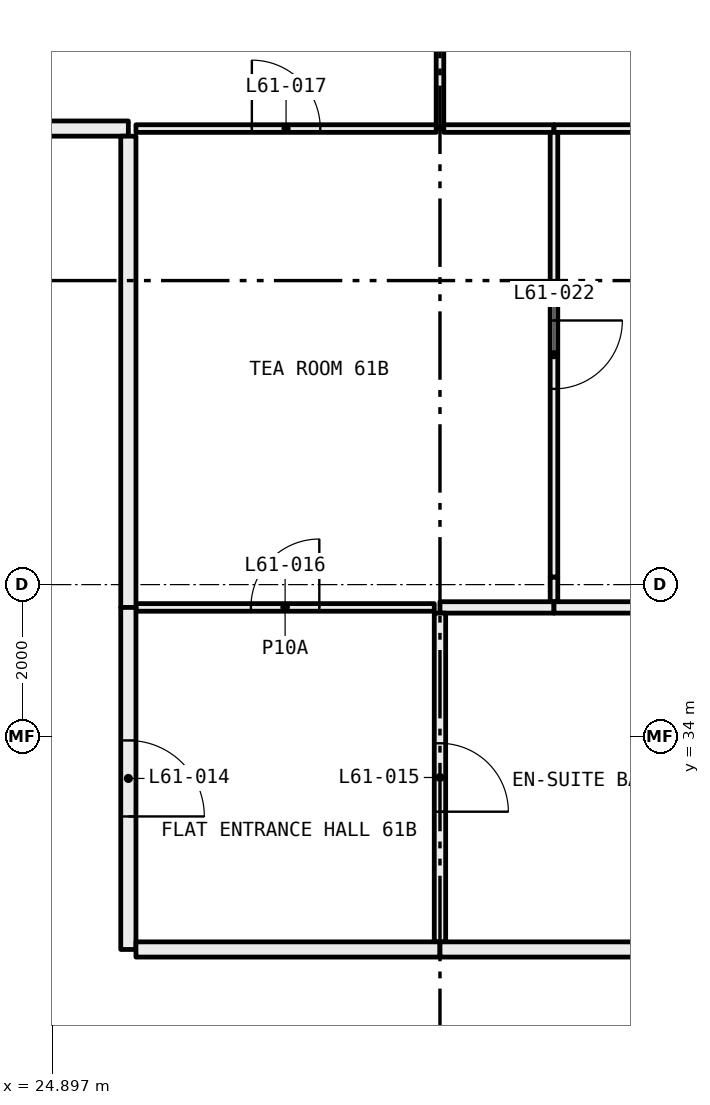
"""IFC4 building model, lengths in metres.
Left out: names, types, materials, properties, quantities, classifications, styles, units other than length and angle.
Written with IfcOpenShell. Run it as: python <this file> out.ifc"""

import sys

from ifc_helpers import new_model, si_unit, direction, frame, frame_2d, origin, place, context, subcontext, project, spatial, rectangle, extrude, element, fill, save


model = new_model("IFC4")
c1 = context("Model", 3, precision=1e-05, world=origin(), true_north=direction((0.0, 1.0)))
c2 = subcontext(c1, "Body", "Model", "MODEL_VIEW")
j1 = project(units=[si_unit("LENGTHUNIT", "METRE"), si_unit("PLANEANGLEUNIT", "RADIAN")], contexts=[c1])
p1 = place(None, origin())
s1 = spatial("IfcSite", under=j1, at=p1, CompositionType="ELEMENT")
p2 = place(p1, origin())
s2 = spatial("IfcBuilding", under=s1, at=p2, CompositionType="ELEMENT")
p3 = place(p2, frame((0.0, 0.0, 228.3)))
s3 = spatial("IfcBuildingStorey", under=s2, at=p3, CompositionType="ELEMENT", Elevation=228.3)
p4 = place(p3, frame((30.0, 42.0, 0.0), z_axis=(0.0, 0.0, 1.0), x_axis=(0.0, 1.0, 0.0)))
e1 = element("IfcWall", 1, at=p4, inside=s3, PredefinedType="PARTITIONING", context=c2, shape_type="SweptSolid", body=[
    extrude(rectangle(XDim=5.28, YDim=0.1, at=frame_2d((2.64, 0.0))), origin(), (0.0, 0.0, 1.0), 3.05),
])
p5 = place(p4, frame((2.19, 0.0, 0.0)))
e2 = element("IfcOpeningElement", 2, at=p5, cuts=e1, PredefinedType="OPENING", context=c2, shape_type="SweptSolid", body=[
    extrude(rectangle(XDim=0.9, YDim=2.1, at=frame_2d((0.45, 1.05))), frame((0.0, 0.06, 0.0), z_axis=(0.0, -1.0, 0.0), x_axis=(1.0, 0.0, 0.0)), (0.0, 0.0, 1.0), 0.12),
])
p6 = place(p3, frame((26.0, 42.0, 0.0), z_axis=(0.0, 0.0, 1.0), x_axis=(1.0, 0.0, 0.0)))
e3 = element("IfcWall", 3, at=p6, inside=s3, PredefinedType="PARTITIONING", context=c2, shape_type="SweptSolid", body=[
    extrude(rectangle(XDim=3.95, YDim=0.1, at=frame_2d((1.975, 0.0))), origin(), (0.0, 0.0, 1.0), 3.05),
])
p7 = place(p6, frame((1.525, 0.0, 0.0)))
e4 = element("IfcOpeningElement", 4, at=p7, cuts=e3, PredefinedType="OPENING", context=c2, shape_type="SweptSolid", body=[
    extrude(rectangle(XDim=0.9, YDim=2.1, at=frame_2d((0.45, 1.05))), frame((0.0, 0.06, 0.0), z_axis=(0.0, -1.0, 0.0), x_axis=(1.0, 0.0, 0.0)), (0.0, 0.0, 1.0), 0.12),
])
p8 = place(p3, frame((24.0, 42.0, 0.0), z_axis=(0.0, 0.0, 1.0), x_axis=(1.0, 0.0, 0.0)))
e5 = element("IfcWall", 5, at=p8, inside=s3, PredefinedType="PARTITIONING", context=c2, shape_type="SweptSolid", body=[
    extrude(rectangle(XDim=1.9, YDim=0.2, at=frame_2d((0.95, 0.0))), origin(), (0.0, 0.0, 1.0), 3.05),
])
p9 = place(p3, frame((30.05, 42.0, 0.0), z_axis=(0.0, 0.0, 1.0), x_axis=(1.0, 0.0, 0.0)))
e6 = element("IfcWall", 6, at=p9, inside=s3, PredefinedType="PARTITIONING", context=c2, shape_type="SweptSolid", body=[
    extrude(rectangle(XDim=1.45, YDim=0.1, at=frame_2d((0.725, 0.0))), origin(), (0.0, 0.0, 1.0), 3.05),
])
p10 = place(p3, frame((31.5, 42.0, 0.0), z_axis=(0.0, 0.0, 1.0), x_axis=(1.0, 0.0, 0.0)))
e7 = element("IfcWall", 7, at=p10, inside=s3, PredefinedType="PARTITIONING", context=c2, shape_type="SweptSolid", body=[
    extrude(rectangle(XDim=4.45, YDim=0.1, at=frame_2d((2.225, 0.0))), origin(), (0.0, 0.0, 1.0), 2.45),
])
p11 = place(p3, frame((31.5, 35.775, 0.0), z_axis=(0.0, 0.0, 1.0), x_axis=(0.0, 1.0, 0.0)))
e8 = element("IfcWall", 8, at=p11, inside=s3, PredefinedType="PARTITIONING", context=c2, shape_type="SweptSolid", body=[
    extrude(rectangle(XDim=0.325, YDim=0.1, at=frame_2d((0.163, 0.0))), origin(), (0.0, 0.0, 1.0), 2.45),
])
p12 = place(p3, frame((31.5, 36.1, 0.0), z_axis=(0.0, 0.0, 1.0), x_axis=(0.0, 1.0, 0.0)))
e9 = element("IfcWall", 9, at=p12, inside=s3, PredefinedType="PARTITIONING", context=c2, shape_type="SweptSolid", body=[
    extrude(rectangle(XDim=5.85, YDim=0.1, at=frame_2d((2.925, 0.0))), origin(), (0.0, 0.0, 1.0), 3.05),
])
p13 = place(p12, frame((2.475, 0.0, 0.0)))
e10 = element("IfcOpeningElement", 10, at=p13, cuts=e9, PredefinedType="OPENING", context=c2, shape_type="SweptSolid", body=[
    extrude(rectangle(XDim=0.9, YDim=2.1, at=frame_2d((0.45, 1.05))), frame((0.0, 0.06, 0.0), z_axis=(0.0, -1.0, 0.0), x_axis=(1.0, 0.0, 0.0)), (0.0, 0.0, 1.0), 0.12),
])
p14 = place(p3, frame((26.0, 35.7, 0.0), z_axis=(0.0, 0.0, 1.0), x_axis=(1.0, 0.0, 0.0)))
e11 = element("IfcWall", 11, at=p14, inside=s3, PredefinedType="PARTITIONING", context=c2, shape_type="SweptSolid", body=[
    extrude(rectangle(XDim=3.925, YDim=0.1, at=frame_2d((1.962, 0.0))), origin(), (0.0, 0.0, 1.0), 3.05),
])
p15 = place(p14, frame((1.512, 0.0, 0.0)))
e12 = element("IfcOpeningElement", 12, at=p15, cuts=e11, PredefinedType="OPENING", context=c2, shape_type="SweptSolid", body=[
    extrude(rectangle(XDim=0.9, YDim=2.1, at=frame_2d((0.45, 1.05))), frame((0.0, 0.06, 0.0), z_axis=(0.0, -1.0, 0.0), x_axis=(1.0, 0.0, 0.0)), (0.0, 0.0, 1.0), 0.12),
])
p16 = place(p3, frame((30.0, 35.7, 0.0), z_axis=(0.0, 0.0, 1.0), x_axis=(1.0, 0.0, 0.0)))
e13 = element("IfcWall", 13, at=p16, inside=s3, PredefinedType="PARTITIONING", context=c2, shape_type="SweptSolid", body=[
    extrude(rectangle(XDim=1.5, YDim=0.15, at=frame_2d((0.75, 0.0))), origin(), (0.0, 0.0, 1.0), 3.05),
])
p17 = place(p3, frame((25.9, 41.9, 0.0), z_axis=(0.0, 0.0, 1.0), x_axis=(0.0, -1.0, 0.0)))
e14 = element("IfcWall", 14, at=p17, inside=s3, PredefinedType="PARTITIONING", context=c2, shape_type="SweptSolid", body=[
    extrude(rectangle(XDim=6.2, YDim=0.2, at=frame_2d((3.1, 0.0))), origin(), (0.0, 0.0, 1.0), 2.45),
])
p18 = place(p3, frame((31.5, 35.7, 0.0), z_axis=(0.0, 0.0, 1.0), x_axis=(1.0, 0.0, 0.0)))
e15 = element("IfcWall", 15, at=p18, inside=s3, PredefinedType="PARTITIONING", context=c2, shape_type="SweptSolid", body=[
    extrude(rectangle(XDim=3.0, YDim=0.15, at=frame_2d((1.5, 0.0))), origin(), (0.0, 0.0, 1.0), 3.05),
])
p19 = place(p3, frame((30.0, 31.3, 0.0), z_axis=(0.0, 0.0, 1.0), x_axis=(0.0, 1.0, 0.0)))
e16 = element("IfcWall", 16, at=p19, inside=s3, PredefinedType="PARTITIONING", context=c2, shape_type="SweptSolid", body=[
    extrude(rectangle(XDim=4.325, YDim=0.15, at=frame_2d((2.163, 0.0))), origin(), (0.0, 0.0, 1.0), 3.05),
])
p20 = place(p19, frame((1.712, 0.0, 0.0)))
e17 = element("IfcOpeningElement", 17, at=p20, cuts=e16, PredefinedType="OPENING", context=c2, shape_type="SweptSolid", body=[
    extrude(rectangle(XDim=0.9, YDim=2.1, at=frame_2d((0.45, 1.05))), frame((0.0, 0.085, 0.0), z_axis=(0.0, -1.0, 0.0), x_axis=(1.0, 0.0, 0.0)), (0.0, 0.0, 1.0), 0.17),
])
p21 = place(p3, frame((25.9, 35.7, 0.0), z_axis=(0.0, 0.0, 1.0), x_axis=(0.0, -1.0, 0.0)))
e18 = element("IfcWall", 18, at=p21, inside=s3, PredefinedType="PARTITIONING", context=c2, shape_type="SweptSolid", body=[
    extrude(rectangle(XDim=4.5, YDim=0.2, at=frame_2d((2.25, 0.0))), origin(), (0.0, 0.0, 1.0), 3.05),
])
p22 = place(p21, frame((1.75, 0.0, 0.0)))
e19 = element("IfcOpeningElement", 19, at=p22, cuts=e18, PredefinedType="OPENING", context=c2, shape_type="SweptSolid", body=[
    extrude(rectangle(XDim=1.0, YDim=2.1, at=frame_2d((0.5, 1.05))), frame((0.0, 0.11, 0.0), z_axis=(0.0, -1.0, 0.0), x_axis=(1.0, 0.0, 0.0)), (0.0, 0.0, 1.0), 0.22),
])
p23 = place(p3, frame((26.0, 31.2, 0.0), z_axis=(0.0, 0.0, 1.0), x_axis=(1.0, 0.0, 0.0)))
e20 = element("IfcWall", 20, at=p23, inside=s3, PredefinedType="PARTITIONING", context=c2, shape_type="SweptSolid", body=[
    extrude(rectangle(XDim=4.0, YDim=0.2, at=frame_2d((2.0, 0.0))), origin(), (0.0, 0.0, 1.0), 3.05),
])
p24 = place(p3, frame((30.0, 31.2, 0.0), z_axis=(0.0, 0.0, 1.0), x_axis=(1.0, 0.0, 0.0)))
e21 = element("IfcWall", 21, at=p24, inside=s3, PredefinedType="PARTITIONING", context=c2, shape_type="SweptSolid", body=[
    extrude(rectangle(XDim=4.5, YDim=0.2, at=frame_2d((2.25, 0.0))), origin(), (0.0, 0.0, 1.0), 3.05),
])
p25 = place(p22, origin())
e22 = element("IfcDoor", 22, at=p25, inside=s3, OperationType="SINGLE_SWING_LEFT", PredefinedType="DOOR", context=c2, shape_type="SweptSolid", body=[
    extrude(rectangle(XDim=1.0, YDim=2.1, at=frame_2d((0.5, 1.05))), frame((0.0, 0.025, 0.0), z_axis=(0.0, -1.0, 0.0), x_axis=(1.0, 0.0, 0.0)), (0.0, 0.0, 1.0), 0.05),
])
fill(e19, e22)
p26 = place(p20, frame((0.9, 0.0, 0.0), x_axis=(-1.0, 0.0, 0.0)))
e23 = element("IfcDoor", 23, at=p26, inside=s3, OperationType="SINGLE_SWING_LEFT", PredefinedType="DOOR", context=c2, shape_type="SweptSolid", body=[
    extrude(rectangle(XDim=0.9, YDim=2.1, at=frame_2d((0.45, 1.05))), frame((0.0, 0.025, 0.0), z_axis=(0.0, -1.0, 0.0), x_axis=(1.0, 0.0, 0.0)), (0.0, 0.0, 1.0), 0.05),
])
fill(e17, e23)
p27 = place(p15, origin())
e24 = element("IfcDoor", 24, at=p27, inside=s3, OperationType="SINGLE_SWING_LEFT", PredefinedType="DOOR", context=c2, shape_type="SweptSolid", body=[
    extrude(rectangle(XDim=0.9, YDim=2.1, at=frame_2d((0.45, 1.05))), frame((0.0, 0.025, 0.0), z_axis=(0.0, -1.0, 0.0), x_axis=(1.0, 0.0, 0.0)), (0.0, 0.0, 1.0), 0.05),
])
fill(e12, e24)
p28 = place(p7, origin())
e25 = element("IfcDoor", 25, at=p28, inside=s3, OperationType="SINGLE_SWING_RIGHT", PredefinedType="DOOR", context=c2, shape_type="SweptSolid", body=[
    extrude(rectangle(XDim=0.9, YDim=2.1, at=frame_2d((0.45, 1.05))), frame((0.0, 0.025, 0.0), z_axis=(0.0, -1.0, 0.0), x_axis=(1.0, 0.0, 0.0)), (0.0, 0.0, 1.0), 0.05),
])
fill(e4, e25)
p29 = place(p13, frame((0.9, 0.0, 0.0), x_axis=(-1.0, 0.0, 0.0)))
e26 = element("IfcDoor", 26, at=p29, inside=s3, OperationType="SINGLE_SWING_RIGHT", PredefinedType="DOOR", context=c2, shape_type="SweptSolid", body=[
    extrude(rectangle(XDim=0.9, YDim=2.1, at=frame_2d((0.45, 1.05))), frame((0.0, 0.025, 0.0), z_axis=(0.0, -1.0, 0.0), x_axis=(1.0, 0.0, 0.0)), (0.0, 0.0, 1.0), 0.05),
])
fill(e10, e26)
save(model, sys.argv[1])
